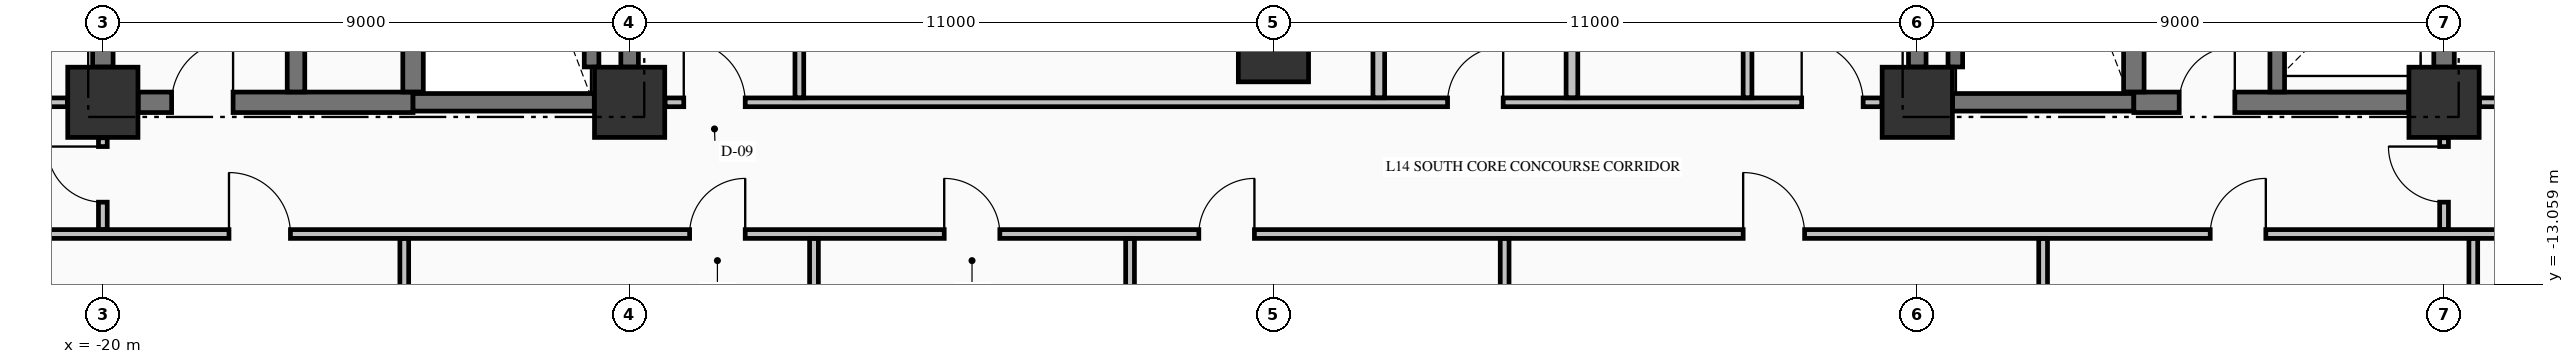
"""IFC4 building model, lengths in metres.
Left out: names, types, materials, properties, quantities, classifications, styles, units other than length and angle.
Written with IfcOpenShell. Run it as: python <this file> out.ifc"""

import sys

from ifc_helpers import new_model, si_unit, direction, frame, frame_2d, origin, origin_2d, place, context, subcontext, project, spatial, rectangle, extrude, element, fill, save


model = new_model("IFC4")
c1 = context("Model", 3, precision=1e-05, world=origin(), true_north=direction((0.0, 1.0)))
c2 = subcontext(c1, "Body", "Model", "MODEL_VIEW")
j1 = project(units=[si_unit("LENGTHUNIT", "METRE"), si_unit("PLANEANGLEUNIT", "RADIAN")], contexts=[c1])
p1 = place(None, origin())
s1 = spatial("IfcSite", under=j1, at=p1, CompositionType="ELEMENT")
p2 = place(p1, origin())
s2 = spatial("IfcBuilding", under=s1, at=p2, CompositionType="ELEMENT")
p3 = place(p2, frame((0.0, 0.0, 60.76)))
s3 = spatial("IfcBuildingStorey", under=s2, at=p3, CompositionType="ELEMENT", Elevation=60.76)
for number, where, z_axis, x_axis in (
    (1, (-20.0, -9.95, -0.3), (0.0, 0.0, 1.0), (1.0, 0.0, 0.0)),
    (2, (-11.0, -9.95, -0.3), (0.0, 0.0, 1.0), (1.0, 0.0, 0.0)),
    (3, (11.0, -9.95, -0.3), (0.0, 0.0, 1.0), (1.0, 0.0, 0.0)),
    (4, (20.0, -9.95, -0.3), (0.0, 0.0, 1.0), (1.0, 0.0, 0.0)),
    (5, (0.0, -9.0, -0.3), (0.0, 0.0, 1.0), (1.0, 0.0, 0.0)),
):
    element("IfcColumn", number, at=place(p3, frame(where, z_axis=z_axis, x_axis=x_axis)), inside=s3, PredefinedType="COLUMN", context=c2, shape_type="SweptSolid", body=[
        extrude(rectangle(XDim=1.2, YDim=1.2, at=origin_2d()), origin(), (0.0, 0.0, 1.0), 3.62),
    ])
p4 = place(p3, frame((-19.396, -9.95, 0.0), z_axis=(0.0, 0.0, 1.0), x_axis=(1.0, 0.0, 0.0)))
e6 = element("IfcWall", 6, at=p4, inside=s3, PredefinedType="SHEAR", context=c2, shape_type="SweptSolid", body=[
    extrude(rectangle(XDim=4.696, YDim=0.35, at=frame_2d((2.348, 0.0))), origin(), (0.0, 0.0, 1.0), 3.32),
])
p5 = place(p4, frame((0.571, 0.0, 0.0)))
e7 = element("IfcOpeningElement", 7, at=p5, cuts=e6, PredefinedType="OPENING", context=c2, shape_type="SweptSolid", body=[
    extrude(rectangle(XDim=1.05, YDim=2.15, at=frame_2d((0.525, 1.075))), frame((0.0, 0.185, 0.0), z_axis=(0.0, -1.0, 0.0), x_axis=(1.0, 0.0, 0.0)), (0.0, 0.0, 1.0), 0.37),
])
for number, where, z_axis, x_axis in (
    (8, (-14.7, -9.95, 0.0), (0.0, 0.0, 1.0), (1.0, 0.0, 0.0)),
    (9, (11.604, -9.95, 0.0), (0.0, 0.0, 1.0), (1.0, 0.0, 0.0)),
):
    element("IfcWall", number, at=place(p3, frame(where, z_axis=z_axis, x_axis=x_axis)), inside=s3, PredefinedType="SHEAR", context=c2, shape_type="SweptSolid", body=[
        extrude(rectangle(XDim=3.096, YDim=0.3, at=frame_2d((1.548, 0.0))), origin(), (0.0, 0.0, 1.0), 3.32),
    ])
p6 = place(p3, frame((14.7, -9.95, 0.0), z_axis=(0.0, 0.0, 1.0), x_axis=(1.0, 0.0, 0.0)))
e10 = element("IfcWall", 10, at=p6, inside=s3, PredefinedType="SHEAR", context=c2, shape_type="SweptSolid", body=[
    extrude(rectangle(XDim=4.696, YDim=0.35, at=frame_2d((2.348, 0.0))), origin(), (0.0, 0.0, 1.0), 3.32),
])
p7 = place(p6, frame((0.775, 0.0, 0.0)))
e11 = element("IfcOpeningElement", 11, at=p7, cuts=e10, PredefinedType="OPENING", context=c2, shape_type="SweptSolid", body=[
    extrude(rectangle(XDim=0.95, YDim=2.15, at=frame_2d((0.475, 1.075))), frame((0.0, 0.185, 0.0), z_axis=(0.0, -1.0, 0.0), x_axis=(1.0, 0.0, 0.0)), (0.0, 0.0, 1.0), 0.37),
])
p8 = place(p3, frame((-28.835, -12.2, 0.0), z_axis=(0.0, 0.0, 1.0), x_axis=(1.0, 0.0, 0.0)))
e12 = element("IfcWall", 12, at=p8, inside=s3, PredefinedType="PARTITIONING", context=c2, shape_type="SweptSolid", body=[
    extrude(rectangle(XDim=52.67, YDim=0.15, at=frame_2d((26.335, 0.0))), origin(), (0.0, 0.0, 1.0), 3.32),
])
p9 = place(p8, frame((10.99, 0.0, 0.0)))
e13 = element("IfcOpeningElement", 13, at=p9, cuts=e12, PredefinedType="OPENING", context=c2, shape_type="SweptSolid", body=[
    extrude(rectangle(XDim=1.05, YDim=2.15, at=frame_2d((0.525, 1.075))), frame((0.0, 0.085, 0.0), z_axis=(0.0, -1.0, 0.0), x_axis=(1.0, 0.0, 0.0)), (0.0, 0.0, 1.0), 0.17),
])
p10 = place(p8, frame((18.86, 0.0, 0.0)))
e14 = element("IfcOpeningElement", 14, at=p10, cuts=e12, PredefinedType="OPENING", context=c2, shape_type="SweptSolid", body=[
    extrude(rectangle(XDim=0.95, YDim=2.15, at=frame_2d((0.475, 1.075))), frame((0.0, 0.085, 0.0), z_axis=(0.0, -1.0, 0.0), x_axis=(1.0, 0.0, 0.0)), (0.0, 0.0, 1.0), 0.17),
])
p11 = place(p8, frame((23.21, 0.0, 0.0)))
e15 = element("IfcOpeningElement", 15, at=p11, cuts=e12, PredefinedType="OPENING", context=c2, shape_type="SweptSolid", body=[
    extrude(rectangle(XDim=0.95, YDim=2.15, at=frame_2d((0.475, 1.075))), frame((0.0, 0.085, 0.0), z_axis=(0.0, -1.0, 0.0), x_axis=(1.0, 0.0, 0.0)), (0.0, 0.0, 1.0), 0.17),
])
p12 = place(p8, frame((27.56, 0.0, 0.0)))
e16 = element("IfcOpeningElement", 16, at=p12, cuts=e12, PredefinedType="OPENING", context=c2, shape_type="SweptSolid", body=[
    extrude(rectangle(XDim=0.95, YDim=2.15, at=frame_2d((0.475, 1.075))), frame((0.0, 0.085, 0.0), z_axis=(0.0, -1.0, 0.0), x_axis=(1.0, 0.0, 0.0)), (0.0, 0.0, 1.0), 0.17),
])
p13 = place(p8, frame((36.86, 0.0, 0.0)))
e17 = element("IfcOpeningElement", 17, at=p13, cuts=e12, PredefinedType="OPENING", context=c2, shape_type="SweptSolid", body=[
    extrude(rectangle(XDim=1.05, YDim=2.15, at=frame_2d((0.525, 1.075))), frame((0.0, 0.085, 0.0), z_axis=(0.0, -1.0, 0.0), x_axis=(1.0, 0.0, 0.0)), (0.0, 0.0, 1.0), 0.17),
])
p14 = place(p8, frame((44.84, 0.0, 0.0)))
e18 = element("IfcOpeningElement", 18, at=p14, cuts=e12, PredefinedType="OPENING", context=c2, shape_type="SweptSolid", body=[
    extrude(rectangle(XDim=0.95, YDim=2.15, at=frame_2d((0.475, 1.075))), frame((0.0, 0.085, 0.0), z_axis=(0.0, -1.0, 0.0), x_axis=(1.0, 0.0, 0.0)), (0.0, 0.0, 1.0), 0.17),
])
p15 = place(p3, frame((-28.835, -9.95, 0.0), z_axis=(0.0, 0.0, 1.0), x_axis=(1.0, 0.0, 0.0)))
e19 = element("IfcWall", 19, at=p15, inside=s3, PredefinedType="PARTITIONING", context=c2, shape_type="SweptSolid", body=[
    extrude(rectangle(XDim=8.229, YDim=0.15, at=frame_2d((4.115, 0.0))), origin(), (0.0, 0.0, 1.0), 3.32),
])
p16 = place(p15, frame((3.835, 0.0, 0.0)))
e20 = element("IfcOpeningElement", 20, at=p16, cuts=e19, PredefinedType="OPENING", context=c2, shape_type="SweptSolid", body=[
    extrude(rectangle(XDim=1.0, YDim=2.15, at=frame_2d((0.5, 1.075))), frame((0.0, 0.085, 0.0), z_axis=(0.0, -1.0, 0.0), x_axis=(1.0, 0.0, 0.0)), (0.0, 0.0, 1.0), 0.17),
])
p17 = place(p3, frame((-10.394, -9.95, 0.0), z_axis=(0.0, 0.0, 1.0), x_axis=(1.0, 0.0, 0.0)))
e21 = element("IfcWall", 21, at=p17, inside=s3, PredefinedType="PARTITIONING", context=c2, shape_type="SweptSolid", body=[
    extrude(rectangle(XDim=20.788, YDim=0.15, at=frame_2d((10.394, 0.0))), origin(), (0.0, 0.0, 1.0), 3.32),
])
p18 = place(p17, frame((0.319, 0.0, 0.0)))
e22 = element("IfcOpeningElement", 22, at=p18, cuts=e21, PredefinedType="OPENING", context=c2, shape_type="SweptSolid", body=[
    extrude(rectangle(XDim=1.05, YDim=2.15, at=frame_2d((0.525, 1.075))), frame((0.0, 0.085, 0.0), z_axis=(0.0, -1.0, 0.0), x_axis=(1.0, 0.0, 0.0)), (0.0, 0.0, 1.0), 0.17),
])
p19 = place(p17, frame((19.419, 0.0, 0.0)))
e23 = element("IfcOpeningElement", 23, at=p19, cuts=e21, PredefinedType="OPENING", context=c2, shape_type="SweptSolid", body=[
    extrude(rectangle(XDim=1.05, YDim=2.15, at=frame_2d((0.525, 1.075))), frame((0.0, 0.085, 0.0), z_axis=(0.0, -1.0, 0.0), x_axis=(1.0, 0.0, 0.0)), (0.0, 0.0, 1.0), 0.17),
])
p20 = place(p17, frame((13.369, 0.0, 0.0)))
e24 = element("IfcOpeningElement", 24, at=p20, cuts=e21, PredefinedType="OPENING", context=c2, shape_type="SweptSolid", body=[
    extrude(rectangle(XDim=0.95, YDim=2.15, at=frame_2d((0.475, 1.075))), frame((0.0, 0.085, 0.0), z_axis=(0.0, -1.0, 0.0), x_axis=(1.0, 0.0, 0.0)), (0.0, 0.0, 1.0), 0.17),
])
p21 = place(p3, frame((20.606, -9.95, 0.0), z_axis=(0.0, 0.0, 1.0), x_axis=(1.0, 0.0, 0.0)))
e25 = element("IfcWall", 25, at=p21, inside=s3, PredefinedType="PARTITIONING", context=c2, shape_type="SweptSolid", body=[
    extrude(rectangle(XDim=3.229, YDim=0.15, at=frame_2d((1.615, 0.0))), origin(), (0.0, 0.0, 1.0), 3.32),
])
p22 = place(p21, frame((0.919, 0.0, 0.0)))
e26 = element("IfcOpeningElement", 26, at=p22, cuts=e25, PredefinedType="OPENING", context=c2, shape_type="SweptSolid", body=[
    extrude(rectangle(XDim=0.95, YDim=2.15, at=frame_2d((0.475, 1.075))), frame((0.0, 0.085, 0.0), z_axis=(0.0, -1.0, 0.0), x_axis=(1.0, 0.0, 0.0)), (0.0, 0.0, 1.0), 0.17),
])
p23 = place(p3, frame((-20.0, -9.346, 0.0), z_axis=(0.0, 0.0, 1.0), x_axis=(0.0, 1.0, 0.0)))
e27 = element("IfcWall", 27, at=p23, inside=s3, PredefinedType="SHEAR", context=c2, shape_type="SweptSolid", body=[
    extrude(rectangle(XDim=8.742, YDim=0.35, at=frame_2d((4.371, 0.0))), origin(), (0.0, 0.0, 1.0), 3.32),
])
p24 = place(p3, frame((-16.7, -9.773, 0.0), z_axis=(0.0, 0.0, 1.0), x_axis=(0.0, 1.0, 0.0)))
e28 = element("IfcWall", 28, at=p24, inside=s3, PredefinedType="SHEAR", context=c2, shape_type="SweptSolid", body=[
    extrude(rectangle(XDim=9.371, YDim=0.3, at=frame_2d((4.686, 0.0))), origin(), (0.0, 0.0, 1.0), 3.32),
])
p25 = place(p3, frame((-14.7, -9.773, 0.0), z_axis=(0.0, 0.0, 1.0), x_axis=(0.0, 1.0, 0.0)))
e29 = element("IfcWall", 29, at=p25, inside=s3, PredefinedType="SHEAR", context=c2, shape_type="SweptSolid", body=[
    extrude(rectangle(XDim=9.371, YDim=0.35, at=frame_2d((4.686, 0.0))), origin(), (0.0, 0.0, 1.0), 3.32),
])
p26 = place(p3, frame((-11.65, -9.346, 0.0), z_axis=(0.0, 0.0, 1.0), x_axis=(0.0, 1.0, 0.0)))
e30 = element("IfcWall", 30, at=p26, inside=s3, PredefinedType="SOLIDWALL", context=c2, shape_type="SweptSolid", body=[
    extrude(rectangle(XDim=8.742, YDim=0.25, at=frame_2d((4.371, 0.0))), origin(), (0.0, 0.0, 1.0), 3.32),
])
for number, where, z_axis, x_axis in (
    (31, (-11.0, -9.346, 0.0), (0.0, 0.0, 1.0), (0.0, 1.0, 0.0)),
    (32, (11.0, -9.346, 0.0), (0.0, 0.0, 1.0), (0.0, 1.0, 0.0)),
):
    element("IfcWall", number, at=place(p3, frame(where, z_axis=z_axis, x_axis=x_axis)), inside=s3, PredefinedType="SHEAR", context=c2, shape_type="SweptSolid", body=[
        extrude(rectangle(XDim=8.742, YDim=0.3, at=frame_2d((4.371, 0.0))), origin(), (0.0, 0.0, 1.0), 3.32),
    ])
p27 = place(p3, frame((11.65, -9.346, 0.0), z_axis=(0.0, 0.0, 1.0), x_axis=(0.0, 1.0, 0.0)))
e33 = element("IfcWall", 33, at=p27, inside=s3, PredefinedType="SOLIDWALL", context=c2, shape_type="SweptSolid", body=[
    extrude(rectangle(XDim=8.742, YDim=0.25, at=frame_2d((4.371, 0.0))), origin(), (0.0, 0.0, 1.0), 3.32),
])
p28 = place(p3, frame((14.7, -9.773, 0.0), z_axis=(0.0, 0.0, 1.0), x_axis=(0.0, 1.0, 0.0)))
e34 = element("IfcWall", 34, at=p28, inside=s3, PredefinedType="SHEAR", context=c2, shape_type="SweptSolid", body=[
    extrude(rectangle(XDim=9.371, YDim=0.35, at=frame_2d((4.686, 0.0))), origin(), (0.0, 0.0, 1.0), 3.32),
])
p29 = place(p3, frame((17.15, -9.773, 0.0), z_axis=(0.0, 0.0, 1.0), x_axis=(0.0, 1.0, 0.0)))
e35 = element("IfcWall", 35, at=p29, inside=s3, PredefinedType="SOLIDWALL", context=c2, shape_type="SweptSolid", body=[
    extrude(rectangle(XDim=2.596, YDim=0.25, at=frame_2d((1.298, 0.0))), origin(), (0.0, 0.0, 1.0), 3.32),
])
p30 = place(p3, frame((20.0, -9.346, 0.0), z_axis=(0.0, 0.0, 1.0), x_axis=(0.0, 1.0, 0.0)))
e36 = element("IfcWall", 36, at=p30, inside=s3, PredefinedType="SHEAR", context=c2, shape_type="SweptSolid", body=[
    extrude(rectangle(XDim=2.169, YDim=0.35, at=frame_2d((1.084, 0.0))), origin(), (0.0, 0.0, 1.0), 3.32),
])
p31 = place(p3, frame((-20.0, -12.122, 0.0), z_axis=(0.0, 0.0, 1.0), x_axis=(0.0, 1.0, 0.0)))
e37 = element("IfcWall", 37, at=p31, inside=s3, PredefinedType="PARTITIONING", context=c2, shape_type="SweptSolid", body=[
    extrude(rectangle(XDim=1.566, YDim=0.15, at=frame_2d((0.783, 0.0))), origin(), (0.0, 0.0, 1.0), 2.66),
])
p32 = place(p31, frame((0.466, 0.0, 0.0)))
e38 = element("IfcOpeningElement", 38, at=p32, cuts=e37, PredefinedType="OPENING", context=c2, shape_type="SweptSolid", body=[
    extrude(rectangle(XDim=0.95, YDim=2.15, at=frame_2d((0.475, 1.075))), frame((0.0, 0.085, 0.0), z_axis=(0.0, -1.0, 0.0), x_axis=(1.0, 0.0, 0.0)), (0.0, 0.0, 1.0), 0.17),
])
p33 = place(p3, frame((-14.85, -26.335, 0.0), z_axis=(0.0, 0.0, 1.0), x_axis=(0.0, 1.0, 0.0)))
e39 = element("IfcWall", 39, at=p33, inside=s3, PredefinedType="PARTITIONING", context=c2, shape_type="SweptSolid", body=[
    extrude(rectangle(XDim=14.057, YDim=0.15, at=frame_2d((7.028, 0.0))), origin(), (0.0, 0.0, 1.0), 3.32),
])
p34 = place(p3, frame((-8.1, -9.872, 0.0), z_axis=(0.0, 0.0, 1.0), x_axis=(0.0, 1.0, 0.0)))
e40 = element("IfcWall", 40, at=p34, inside=s3, PredefinedType="PARTITIONING", context=c2, shape_type="SweptSolid", body=[
    extrude(rectangle(XDim=5.769, YDim=0.15, at=frame_2d((2.885, 0.0))), origin(), (0.0, 0.0, 1.0), 3.32),
])
p35 = place(p34, frame((2.427, 0.0, 0.0)))
e41 = element("IfcOpeningElement", 41, at=p35, cuts=e40, PredefinedType="OPENING", context=c2, shape_type="SweptSolid", body=[
    extrude(rectangle(XDim=0.95, YDim=2.15, at=frame_2d((0.475, 1.075))), frame((0.0, 0.085, 0.0), z_axis=(0.0, -1.0, 0.0), x_axis=(1.0, 0.0, 0.0)), (0.0, 0.0, 1.0), 0.17),
])
for number, where, z_axis, x_axis in (
    (42, (-7.85, -26.335, 0.0), (0.0, 0.0, 1.0), (0.0, 1.0, 0.0)),
    (43, (-2.45, -26.335, 0.0), (0.0, 0.0, 1.0), (0.0, 1.0, 0.0)),
):
    element("IfcWall", number, at=place(p3, frame(where, z_axis=z_axis, x_axis=x_axis)), inside=s3, PredefinedType="PARTITIONING", context=c2, shape_type="SweptSolid", body=[
        extrude(rectangle(XDim=14.057, YDim=0.15, at=frame_2d((7.028, 0.0))), origin(), (0.0, 0.0, 1.0), 3.32),
    ])
p36 = place(p3, frame((1.8, -9.872, 0.0), z_axis=(0.0, 0.0, 1.0), x_axis=(0.0, 1.0, 0.0)))
e44 = element("IfcWall", 44, at=p36, inside=s3, PredefinedType="PARTITIONING", context=c2, shape_type="SweptSolid", body=[
    extrude(rectangle(XDim=4.969, YDim=0.2, at=frame_2d((2.484, 0.0))), origin(), (0.0, 0.0, 1.0), 3.32),
])
p37 = place(p3, frame((3.95, -26.335, 0.0), z_axis=(0.0, 0.0, 1.0), x_axis=(0.0, 1.0, 0.0)))
e45 = element("IfcWall", 45, at=p37, inside=s3, PredefinedType="PARTITIONING", context=c2, shape_type="SweptSolid", body=[
    extrude(rectangle(XDim=14.057, YDim=0.15, at=frame_2d((7.028, 0.0))), origin(), (0.0, 0.0, 1.0), 3.32),
])
p38 = place(p3, frame((5.1, -9.872, 0.0), z_axis=(0.0, 0.0, 1.0), x_axis=(0.0, 1.0, 0.0)))
e46 = element("IfcWall", 46, at=p38, inside=s3, PredefinedType="PARTITIONING", context=c2, shape_type="SweptSolid", body=[
    extrude(rectangle(XDim=4.969, YDim=0.2, at=frame_2d((2.484, 0.0))), origin(), (0.0, 0.0, 1.0), 3.32),
])
p39 = place(p3, frame((8.1, -9.872, 0.0), z_axis=(0.0, 0.0, 1.0), x_axis=(0.0, 1.0, 0.0)))
e47 = element("IfcWall", 47, at=p39, inside=s3, PredefinedType="PARTITIONING", context=c2, shape_type="SweptSolid", body=[
    extrude(rectangle(XDim=4.969, YDim=0.15, at=frame_2d((2.484, 0.0))), origin(), (0.0, 0.0, 1.0), 3.32),
])
p40 = place(p39, frame((1.997, 0.0, 0.0)))
e48 = element("IfcOpeningElement", 48, at=p40, cuts=e47, PredefinedType="OPENING", context=c2, shape_type="SweptSolid", body=[
    extrude(rectangle(XDim=0.95, YDim=2.15, at=frame_2d((0.475, 1.075))), frame((0.0, 0.085, 0.0), z_axis=(0.0, -1.0, 0.0), x_axis=(1.0, 0.0, 0.0)), (0.0, 0.0, 1.0), 0.17),
])
p41 = place(p3, frame((13.15, -26.335, 0.0), z_axis=(0.0, 0.0, 1.0), x_axis=(0.0, 1.0, 0.0)))
e49 = element("IfcWall", 49, at=p41, inside=s3, PredefinedType="PARTITIONING", context=c2, shape_type="SweptSolid", body=[
    extrude(rectangle(XDim=14.057, YDim=0.15, at=frame_2d((7.028, 0.0))), origin(), (0.0, 0.0, 1.0), 3.32),
])
p42 = place(p3, frame((20.0, -12.122, 0.0), z_axis=(0.0, 0.0, 1.0), x_axis=(0.0, 1.0, 0.0)))
e50 = element("IfcWall", 50, at=p42, inside=s3, PredefinedType="PARTITIONING", context=c2, shape_type="SweptSolid", body=[
    extrude(rectangle(XDim=1.566, YDim=0.15, at=frame_2d((0.783, 0.0))), origin(), (0.0, 0.0, 1.0), 3.32),
])
p43 = place(p42, frame((0.466, 0.0, 0.0)))
e51 = element("IfcOpeningElement", 51, at=p43, cuts=e50, PredefinedType="OPENING", context=c2, shape_type="SweptSolid", body=[
    extrude(rectangle(XDim=0.95, YDim=2.15, at=frame_2d((0.475, 1.075))), frame((0.0, 0.085, 0.0), z_axis=(0.0, -1.0, 0.0), x_axis=(1.0, 0.0, 0.0)), (0.0, 0.0, 1.0), 0.17),
])
p44 = place(p3, frame((20.5, -22.294, 0.0), z_axis=(0.0, 0.0, 1.0), x_axis=(0.0, 1.0, 0.0)))
e52 = element("IfcWall", 52, at=p44, inside=s3, PredefinedType="PARTITIONING", context=c2, shape_type="SweptSolid", body=[
    extrude(rectangle(XDim=10.016, YDim=0.15, at=frame_2d((5.008, 0.0))), origin(), (0.0, 0.0, 1.0), 3.32),
])
p45 = place(p5, origin())
e53 = element("IfcDoor", 53, at=p45, inside=s3, OperationType="SINGLE_SWING_RIGHT", PredefinedType="DOOR", context=c2, shape_type="SweptSolid", body=[
    extrude(rectangle(XDim=1.05, YDim=2.15, at=frame_2d((0.525, 1.075))), frame((0.0, 0.025, 0.0), z_axis=(0.0, -1.0, 0.0), x_axis=(1.0, 0.0, 0.0)), (0.0, 0.0, 1.0), 0.05),
])
fill(e7, e53)
p46 = place(p7, origin())
e54 = element("IfcDoor", 54, at=p46, inside=s3, OperationType="SINGLE_SWING_RIGHT", PredefinedType="DOOR", context=c2, shape_type="SweptSolid", body=[
    extrude(rectangle(XDim=0.95, YDim=2.15, at=frame_2d((0.475, 1.075))), frame((0.0, 0.025, 0.0), z_axis=(0.0, -1.0, 0.0), x_axis=(1.0, 0.0, 0.0)), (0.0, 0.0, 1.0), 0.05),
])
fill(e11, e54)
p47 = place(p18, origin())
e55 = element("IfcDoor", 55, at=p47, inside=s3, OperationType="SINGLE_SWING_LEFT", PredefinedType="DOOR", context=c2, shape_type="SweptSolid", body=[
    extrude(rectangle(XDim=1.05, YDim=2.15, at=frame_2d((0.525, 1.075))), frame((0.0, 0.025, 0.0), z_axis=(0.0, -1.0, 0.0), x_axis=(1.0, 0.0, 0.0)), (0.0, 0.0, 1.0), 0.05),
])
fill(e22, e55)
p48 = place(p19, origin())
e56 = element("IfcDoor", 56, at=p48, inside=s3, OperationType="SINGLE_SWING_LEFT", PredefinedType="DOOR", context=c2, shape_type="SweptSolid", body=[
    extrude(rectangle(XDim=1.05, YDim=2.15, at=frame_2d((0.525, 1.075))), frame((0.0, 0.025, 0.0), z_axis=(0.0, -1.0, 0.0), x_axis=(1.0, 0.0, 0.0)), (0.0, 0.0, 1.0), 0.05),
])
fill(e23, e56)
p49 = place(p9, origin())
e57 = element("IfcDoor", 57, at=p49, inside=s3, OperationType="SINGLE_SWING_LEFT", PredefinedType="DOOR", context=c2, shape_type="SweptSolid", body=[
    extrude(rectangle(XDim=1.05, YDim=2.15, at=frame_2d((0.525, 1.075))), frame((0.0, 0.025, 0.0), z_axis=(0.0, -1.0, 0.0), x_axis=(1.0, 0.0, 0.0)), (0.0, 0.0, 1.0), 0.05),
])
fill(e13, e57)
p50 = place(p10, origin())
e58 = element("IfcDoor", 58, at=p50, inside=s3, OperationType="SINGLE_SWING_RIGHT", PredefinedType="DOOR", context=c2, shape_type="SweptSolid", body=[
    extrude(rectangle(XDim=0.95, YDim=2.15, at=frame_2d((0.475, 1.075))), frame((0.0, 0.025, 0.0), z_axis=(0.0, -1.0, 0.0), x_axis=(1.0, 0.0, 0.0)), (0.0, 0.0, 1.0), 0.05),
])
fill(e14, e58)
p51 = place(p11, origin())
e59 = element("IfcDoor", 59, at=p51, inside=s3, OperationType="SINGLE_SWING_LEFT", PredefinedType="DOOR", context=c2, shape_type="SweptSolid", body=[
    extrude(rectangle(XDim=0.95, YDim=2.15, at=frame_2d((0.475, 1.075))), frame((0.0, 0.025, 0.0), z_axis=(0.0, -1.0, 0.0), x_axis=(1.0, 0.0, 0.0)), (0.0, 0.0, 1.0), 0.05),
])
fill(e15, e59)
p52 = place(p12, origin())
e60 = element("IfcDoor", 60, at=p52, inside=s3, OperationType="SINGLE_SWING_RIGHT", PredefinedType="DOOR", context=c2, shape_type="SweptSolid", body=[
    extrude(rectangle(XDim=0.95, YDim=2.15, at=frame_2d((0.475, 1.075))), frame((0.0, 0.025, 0.0), z_axis=(0.0, -1.0, 0.0), x_axis=(1.0, 0.0, 0.0)), (0.0, 0.0, 1.0), 0.05),
])
fill(e16, e60)
p53 = place(p13, origin())
e61 = element("IfcDoor", 61, at=p53, inside=s3, OperationType="SINGLE_SWING_LEFT", PredefinedType="DOOR", context=c2, shape_type="SweptSolid", body=[
    extrude(rectangle(XDim=1.05, YDim=2.15, at=frame_2d((0.525, 1.075))), frame((0.0, 0.025, 0.0), z_axis=(0.0, -1.0, 0.0), x_axis=(1.0, 0.0, 0.0)), (0.0, 0.0, 1.0), 0.05),
])
fill(e17, e61)
p54 = place(p14, origin())
e62 = element("IfcDoor", 62, at=p54, inside=s3, OperationType="SINGLE_SWING_RIGHT", PredefinedType="DOOR", context=c2, shape_type="SweptSolid", body=[
    extrude(rectangle(XDim=0.95, YDim=2.15, at=frame_2d((0.475, 1.075))), frame((0.0, 0.025, 0.0), z_axis=(0.0, -1.0, 0.0), x_axis=(1.0, 0.0, 0.0)), (0.0, 0.0, 1.0), 0.05),
])
fill(e18, e62)
p55 = place(p20, origin())
e63 = element("IfcDoor", 63, at=p55, inside=s3, OperationType="SINGLE_SWING_RIGHT", PredefinedType="DOOR", context=c2, shape_type="SweptSolid", body=[
    extrude(rectangle(XDim=0.95, YDim=2.15, at=frame_2d((0.475, 1.075))), frame((0.0, 0.025, 0.0), z_axis=(0.0, -1.0, 0.0), x_axis=(1.0, 0.0, 0.0)), (0.0, 0.0, 1.0), 0.05),
])
fill(e24, e63)
p56 = place(p32, origin())
e64 = element("IfcDoor", 64, at=p56, inside=s3, OperationType="SINGLE_SWING_RIGHT", PredefinedType="DOOR", context=c2, shape_type="SweptSolid", body=[
    extrude(rectangle(XDim=0.95, YDim=2.15, at=frame_2d((0.475, 1.075))), frame((0.0, 0.025, 0.0), z_axis=(0.0, -1.0, 0.0), x_axis=(1.0, 0.0, 0.0)), (0.0, 0.0, 1.0), 0.05),
])
fill(e38, e64)
p57 = place(p43, origin())
e65 = element("IfcDoor", 65, at=p57, inside=s3, OperationType="SINGLE_SWING_RIGHT", PredefinedType="DOOR", context=c2, shape_type="SweptSolid", body=[
    extrude(rectangle(XDim=0.95, YDim=2.15, at=frame_2d((0.475, 1.075))), frame((0.0, 0.025, 0.0), z_axis=(0.0, -1.0, 0.0), x_axis=(1.0, 0.0, 0.0)), (0.0, 0.0, 1.0), 0.05),
])
fill(e51, e65)
save(model, sys.argv[1])
